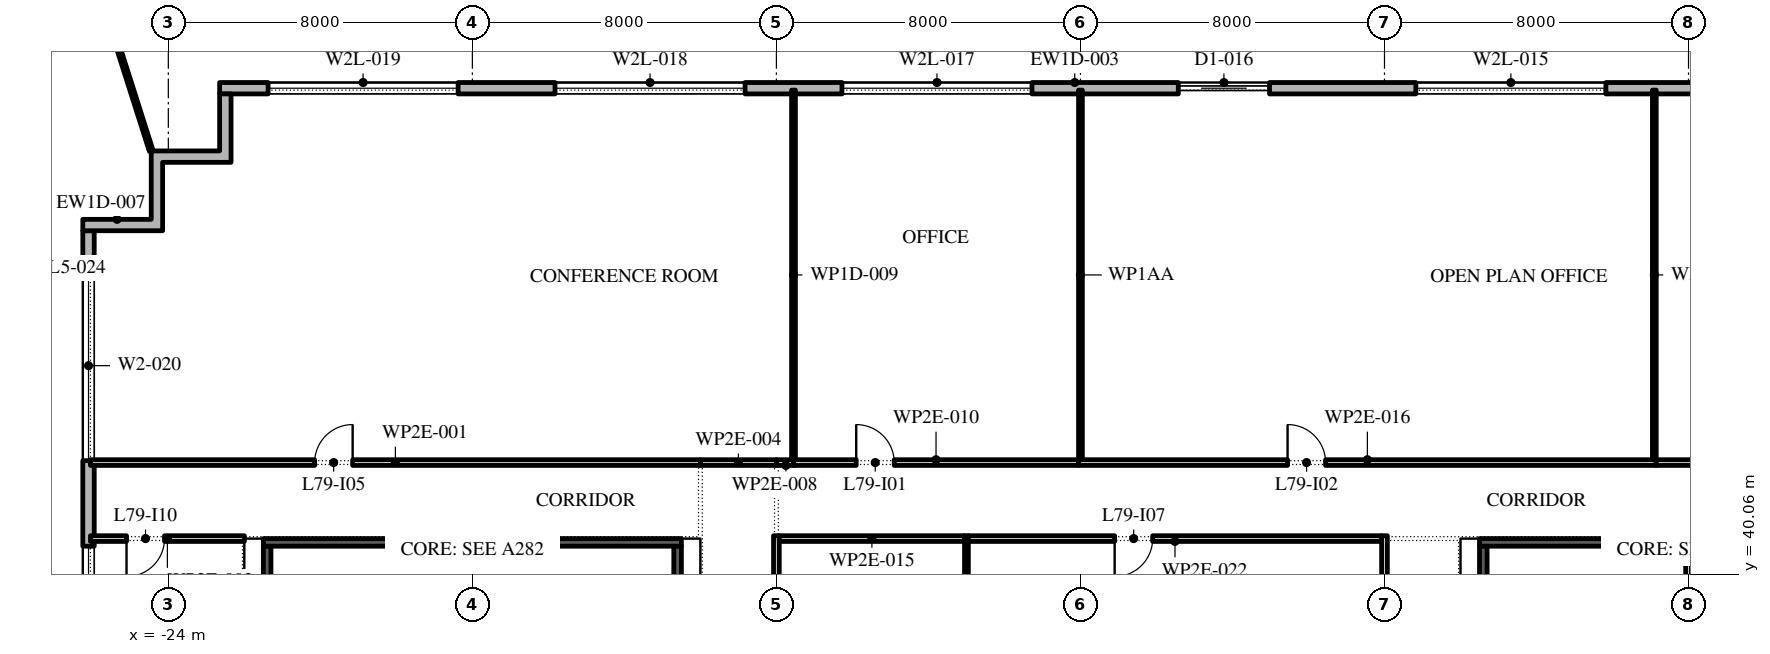
"""IFC4 building model, lengths in metres.
Left out: names, types, materials, properties, quantities, classifications, styles, units other than length and angle.
Written with IfcOpenShell. Run it as: python <this file> out.ifc"""

import sys

from ifc_helpers import new_model, si_unit, direction, frame, frame_2d, origin, place, context, subcontext, project, spatial, polyline, rectangle, outline, extrude, element, fill, save


model = new_model("IFC4")
c1 = context("Model", 3, precision=1e-05, world=origin(), true_north=direction((0.0, 1.0)))
c2 = subcontext(c1, "Body", "Model", "MODEL_VIEW")
j1 = project(units=[si_unit("LENGTHUNIT", "METRE"), si_unit("PLANEANGLEUNIT", "RADIAN")], contexts=[c1])
p1 = place(None, origin())
s1 = spatial("IfcSite", under=j1, at=p1, CompositionType="ELEMENT")
p2 = place(p1, origin())
s2 = spatial("IfcBuilding", under=s1, at=p2, CompositionType="ELEMENT")
p3 = place(p2, frame((0.0, 0.0, 359.4)))
s3 = spatial("IfcBuildingStorey", under=s2, at=p3, CompositionType="ELEMENT", Elevation=359.4)
p4 = place(p3, frame((22.35, 52.85, 0.0), z_axis=(0.0, 0.0, 1.0), x_axis=(-1.0, 0.0, 0.0)))
e1 = element("IfcWall", 1, at=p4, inside=s3, PredefinedType="STANDARD", context=c2, shape_type="SweptSolid", body=[
    extrude(rectangle(XDim=45.0, YDim=0.3, at=frame_2d((22.5, 0.0))), origin(), (0.0, 0.0, 1.0), 3.9),
])
p5 = place(p4, frame((1.125, 0.0, 0.45)))
e2 = element("IfcOpeningElement", 2, at=p5, cuts=e1, PredefinedType="OPENING", context=c2, shape_type="SweptSolid", body=[
    extrude(rectangle(XDim=5.0, YDim=2.4, at=frame_2d((2.5, 1.2))), frame((0.0, 0.16, 0.0), z_axis=(0.0, -1.0, 0.0), x_axis=(1.0, 0.0, 0.0)), (0.0, 0.0, 1.0), 0.32),
])
p6 = place(p4, frame((8.525, 0.0, 0.45)))
e3 = element("IfcOpeningElement", 3, at=p6, cuts=e1, PredefinedType="OPENING", context=c2, shape_type="SweptSolid", body=[
    extrude(rectangle(XDim=5.0, YDim=2.4, at=frame_2d((2.5, 1.2))), frame((0.0, 0.16, 0.0), z_axis=(0.0, -1.0, 0.0), x_axis=(1.0, 0.0, 0.0)), (0.0, 0.0, 1.0), 0.32),
])
p7 = place(p4, frame((17.375, 0.0, 0.0)))
e4 = element("IfcOpeningElement", 4, at=p7, cuts=e1, PredefinedType="OPENING", context=c2, shape_type="SweptSolid", body=[
    extrude(rectangle(XDim=2.4, YDim=3.5, at=frame_2d((1.2, 1.75))), frame((0.0, 0.16, 0.0), z_axis=(0.0, -1.0, 0.0), x_axis=(1.0, 0.0, 0.0)), (0.0, 0.0, 1.0), 0.32),
])
p8 = place(p4, frame((23.625, 0.0, 0.45)))
e5 = element("IfcOpeningElement", 5, at=p8, cuts=e1, PredefinedType="OPENING", context=c2, shape_type="SweptSolid", body=[
    extrude(rectangle(XDim=5.0, YDim=2.4, at=frame_2d((2.5, 1.2))), frame((0.0, 0.16, 0.0), z_axis=(0.0, -1.0, 0.0), x_axis=(1.0, 0.0, 0.0)), (0.0, 0.0, 1.0), 0.32),
])
p9 = place(p4, frame((31.175, 0.0, 0.45)))
e6 = element("IfcOpeningElement", 6, at=p9, cuts=e1, PredefinedType="OPENING", context=c2, shape_type="SweptSolid", body=[
    extrude(rectangle(XDim=5.0, YDim=2.4, at=frame_2d((2.5, 1.2))), frame((0.0, 0.16, 0.0), z_axis=(0.0, -1.0, 0.0), x_axis=(1.0, 0.0, 0.0)), (0.0, 0.0, 1.0), 0.32),
])
p10 = place(p4, frame((38.725, 0.0, 0.45)))
e7 = element("IfcOpeningElement", 7, at=p10, cuts=e1, PredefinedType="OPENING", context=c2, shape_type="SweptSolid", body=[
    extrude(rectangle(XDim=5.0, YDim=2.4, at=frame_2d((2.5, 1.2))), frame((0.0, 0.16, 0.0), z_axis=(0.0, -1.0, 0.0), x_axis=(1.0, 0.0, 0.0)), (0.0, 0.0, 1.0), 0.32),
])
p11 = place(p3, frame((-26.1, 49.1, 0.0), z_axis=(0.0, 0.0, 1.0), x_axis=(0.0, -1.0, 0.0)))
e8 = element("IfcWall", 8, at=p11, inside=s3, PredefinedType="STANDARD", context=c2, shape_type="SweptSolid", body=[
    extrude(rectangle(XDim=51.5, YDim=0.3, at=frame_2d((25.75, 0.0))), origin(), (0.0, 0.0, 1.0), 3.9),
])
p12 = place(p11, frame((1.05, 0.0, 0.45)))
e9 = element("IfcOpeningElement", 9, at=p12, cuts=e8, PredefinedType="OPENING", context=c2, shape_type="SweptSolid", body=[
    extrude(rectangle(XDim=5.0, YDim=3.25, at=frame_2d((2.5, 1.625))), frame((0.0, 0.16, 0.0), z_axis=(0.0, -1.0, 0.0), x_axis=(1.0, 0.0, 0.0)), (0.0, 0.0, 1.0), 0.32),
])
p13 = place(p11, frame((8.3, 0.0, 0.45)))
e10 = element("IfcOpeningElement", 10, at=p13, cuts=e8, PredefinedType="OPENING", context=c2, shape_type="SweptSolid", body=[
    extrude(rectangle(XDim=5.0, YDim=2.9, at=frame_2d((2.5, 1.45))), frame((0.0, 0.16, 0.0), z_axis=(0.0, -1.0, 0.0), x_axis=(1.0, 0.0, 0.0)), (0.0, 0.0, 1.0), 0.32),
])
p14 = place(p11, frame((17.0, 0.0, 0.0)))
e11 = element("IfcOpeningElement", 11, at=p14, cuts=e8, PredefinedType="OPENING", context=c2, shape_type="SweptSolid", body=[
    extrude(rectangle(XDim=2.4, YDim=3.5, at=frame_2d((1.2, 1.75))), frame((0.0, 0.16, 0.0), z_axis=(0.0, -1.0, 0.0), x_axis=(1.0, 0.0, 0.0)), (0.0, 0.0, 1.0), 0.32),
])
p15 = place(p11, frame((23.1, 0.0, 0.45)))
e12 = element("IfcOpeningElement", 12, at=p15, cuts=e8, PredefinedType="OPENING", context=c2, shape_type="SweptSolid", body=[
    extrude(rectangle(XDim=5.0, YDim=2.95, at=frame_2d((2.5, 1.475))), frame((0.0, 0.16, 0.0), z_axis=(0.0, -1.0, 0.0), x_axis=(1.0, 0.0, 0.0)), (0.0, 0.0, 1.0), 0.32),
])
p16 = place(p11, frame((30.5, 0.0, 0.45)))
e13 = element("IfcOpeningElement", 13, at=p16, cuts=e8, PredefinedType="OPENING", context=c2, shape_type="SweptSolid", body=[
    extrude(rectangle(XDim=5.0, YDim=3.25, at=frame_2d((2.5, 1.625))), frame((0.0, 0.16, 0.0), z_axis=(0.0, -1.0, 0.0), x_axis=(1.0, 0.0, 0.0)), (0.0, 0.0, 1.0), 0.32),
])
p17 = place(p11, frame((37.9, 0.0, 0.45)))
e14 = element("IfcOpeningElement", 14, at=p17, cuts=e8, PredefinedType="OPENING", context=c2, shape_type="SweptSolid", body=[
    extrude(rectangle(XDim=5.0, YDim=2.95, at=frame_2d((2.5, 1.475))), frame((0.0, 0.16, 0.0), z_axis=(0.0, -1.0, 0.0), x_axis=(1.0, 0.0, 0.0)), (0.0, 0.0, 1.0), 0.32),
])
p18 = place(p11, frame((46.6, 0.0, 0.0)))
e15 = element("IfcOpeningElement", 15, at=p18, cuts=e8, PredefinedType="OPENING", context=c2, shape_type="SweptSolid", body=[
    extrude(rectangle(XDim=2.4, YDim=3.5, at=frame_2d((1.2, 1.75))), frame((0.0, 0.16, 0.0), z_axis=(0.0, -1.0, 0.0), x_axis=(1.0, 0.0, 0.0)), (0.0, 0.0, 1.0), 0.32),
])
p19 = place(p3, origin())
e16 = element("IfcWall", 16, at=p19, inside=s3, PredefinedType="STANDARD", context=c2, shape_type="SweptSolid", body=[
    extrude(outline(polyline([(-24.45, 49.4), (-24.45, 51.2), (-22.65, 51.2), (-22.65, 52.7), (-22.35, 52.7), (-22.35, 50.9), (-24.15, 50.9), (-24.15, 49.1), (-26.25, 49.1), (-26.25, 49.4), (-24.45, 49.4)])), origin(), (0.0, 0.0, 1.0), 3.9),
])
p20 = place(p3, frame((-24.45, 51.2, -0.05), z_axis=(0.0, 0.0, 1.0), x_axis=(-0.303785175512, 0.952740556048, 0.0)))
e17 = element("IfcWall", 17, at=p20, inside=s3, PredefinedType="STANDARD", context=c2, shape_type="SweptSolid", body=[
    extrude(rectangle(XDim=7.174, YDim=0.1, at=frame_2d((3.587, 0.0))), origin(), (0.0, 0.0, 1.0), 3.95),
])
p21 = place(p3, frame((-21.4, 25.75, 0.0), z_axis=(0.0, 0.0, 1.0), x_axis=(0.0, 1.0, 0.0)))
e18 = element("IfcWall", 18, at=p21, inside=s3, PredefinedType="SHEAR", context=c2, shape_type="SweptSolid", body=[
    extrude(rectangle(XDim=15.05, YDim=0.2, at=frame_2d((7.525, 0.0))), origin(), (0.0, 0.0, 1.0), 3.9),
])
p22 = place(p3, frame((-10.6, 25.75, 0.0), z_axis=(0.0, 0.0, 1.0), x_axis=(0.0, 1.0, 0.0)))
e19 = element("IfcWall", 19, at=p22, inside=s3, PredefinedType="SHEAR", context=c2, shape_type="SweptSolid", body=[
    extrude(rectangle(XDim=15.05, YDim=0.2, at=frame_2d((7.525, 0.0))), origin(), (0.0, 0.0, 1.0), 3.9),
])
p23 = place(p22, frame((7.075, 0.0, 0.0)))
e20 = element("IfcOpeningElement", 20, at=p23, cuts=e19, PredefinedType="OPENING", context=c2, shape_type="SweptSolid", body=[
    extrude(rectangle(XDim=0.9, YDim=2.1, at=frame_2d((0.45, 1.05))), frame((0.0, 0.11, 0.0), z_axis=(0.0, -1.0, 0.0), x_axis=(1.0, 0.0, 0.0)), (0.0, 0.0, 1.0), 0.22),
])
p24 = place(p3, frame((-21.5, 40.9, 0.0), z_axis=(0.0, 0.0, 1.0), x_axis=(1.0, 0.0, 0.0)))
e21 = element("IfcWall", 21, at=p24, inside=s3, PredefinedType="SHEAR", context=c2, shape_type="SweptSolid", body=[
    extrude(rectangle(XDim=11.0, YDim=0.2, at=frame_2d((5.5, 0.0))), origin(), (0.0, 0.0, 1.0), 3.9),
])
p25 = place(p3, frame((10.6, 25.75, 0.0), z_axis=(0.0, 0.0, 1.0), x_axis=(0.0, 1.0, 0.0)))
e22 = element("IfcWall", 22, at=p25, inside=s3, PredefinedType="SHEAR", context=c2, shape_type="SweptSolid", body=[
    extrude(rectangle(XDim=15.05, YDim=0.2, at=frame_2d((7.525, 0.0))), origin(), (0.0, 0.0, 1.0), 3.9),
])
p26 = place(p25, frame((7.075, 0.0, 0.0)))
e23 = element("IfcOpeningElement", 23, at=p26, cuts=e22, PredefinedType="OPENING", context=c2, shape_type="SweptSolid", body=[
    extrude(rectangle(XDim=0.9, YDim=2.1, at=frame_2d((0.45, 1.05))), frame((0.0, 0.11, 0.0), z_axis=(0.0, -1.0, 0.0), x_axis=(1.0, 0.0, 0.0)), (0.0, 0.0, 1.0), 0.22),
])
p27 = place(p3, frame((10.5, 40.9, 0.0), z_axis=(0.0, 0.0, 1.0), x_axis=(1.0, 0.0, 0.0)))
e24 = element("IfcWall", 24, at=p27, inside=s3, PredefinedType="SHEAR", context=c2, shape_type="SweptSolid", body=[
    extrude(rectangle(XDim=11.0, YDim=0.2, at=frame_2d((5.5, 0.0))), origin(), (0.0, 0.0, 1.0), 3.9),
])
p28 = place(p3, frame((16.0, 25.75, 0.0), z_axis=(0.0, 0.0, 1.0), x_axis=(0.0, 1.0, 0.0)))
e25 = element("IfcWall", 25, at=p28, inside=s3, PredefinedType="PARTITIONING", context=c2, shape_type="SweptSolid", body=[
    extrude(rectangle(XDim=15.05, YDim=0.15, at=frame_2d((7.525, 0.0))), origin(), (0.0, 0.0, 1.0), 3.9),
])
p29 = place(p3, frame((-26.05, 43.0, 0.0), z_axis=(0.0, 0.0, 1.0), x_axis=(1.0, 0.0, 0.0)))
e26 = element("IfcWall", 26, at=p29, inside=s3, PredefinedType="PARTITIONING", context=c2, shape_type="SweptSolid", body=[
    extrude(rectangle(XDim=16.05, YDim=0.15, at=frame_2d((8.025, 0.0))), origin(), (0.0, 0.0, 1.0), 3.9),
])
p30 = place(p29, frame((5.9, 0.0, 0.0)))
e27 = element("IfcOpeningElement", 27, at=p30, cuts=e26, PredefinedType="OPENING", context=c2, shape_type="SweptSolid", body=[
    extrude(rectangle(XDim=1.0, YDim=2.1, at=frame_2d((0.5, 1.05))), frame((0.0, 0.085, 0.0), z_axis=(0.0, -1.0, 0.0), x_axis=(1.0, 0.0, 0.0)), (0.0, 0.0, 1.0), 0.17),
])
p31 = place(p3, frame((-22.0, 41.0, 0.0), z_axis=(0.0, 0.0, 1.0), x_axis=(-1.0, 0.0, 0.0)))
e28 = element("IfcWall", 28, at=p31, inside=s3, PredefinedType="PARTITIONING", context=c2, shape_type="SweptSolid", body=[
    extrude(rectangle(XDim=4.05, YDim=0.15, at=frame_2d((2.025, 0.0))), origin(), (0.0, 0.0, 1.0), 3.9),
])
p32 = place(p31, frame((2.1, 0.0, 0.0)))
e29 = element("IfcOpeningElement", 29, at=p32, cuts=e28, PredefinedType="OPENING", context=c2, shape_type="SweptSolid", body=[
    extrude(rectangle(XDim=1.0, YDim=2.1, at=frame_2d((0.5, 1.05))), frame((0.0, 0.085, 0.0), z_axis=(0.0, -1.0, 0.0), x_axis=(1.0, 0.0, 0.0)), (0.0, 0.0, 1.0), 0.17),
])
p33 = place(p3, frame((-10.0, 43.0, 0.0), z_axis=(0.0, 0.0, 1.0), x_axis=(1.0, 0.0, 0.0)))
e30 = element("IfcWall", 30, at=p33, inside=s3, PredefinedType="PARTITIONING", context=c2, shape_type="SweptSolid", body=[
    extrude(rectangle(XDim=2.0, YDim=0.15, at=frame_2d((1.0, 0.0))), origin(), (0.0, 0.0, 1.0), 3.9),
])
p34 = place(p3, frame((-8.0, 41.075, 0.0), z_axis=(0.0, 0.0, 1.0), x_axis=(0.0, -1.0, 0.0)))
e31 = element("IfcWall", 31, at=p34, inside=s3, PredefinedType="PARTITIONING", context=c2, shape_type="SweptSolid", body=[
    extrude(rectangle(XDim=13.925, YDim=0.15, at=frame_2d((6.962, 0.0))), origin(), (0.0, 0.0, 1.0), 3.9),
])
p35 = place(p34, frame((7.975, 0.0, 0.0)))
e32 = element("IfcOpeningElement", 32, at=p35, cuts=e31, PredefinedType="OPENING", context=c2, shape_type="SweptSolid", body=[
    extrude(rectangle(XDim=1.0, YDim=2.1, at=frame_2d((0.5, 1.05))), frame((0.0, 0.085, 0.0), z_axis=(0.0, -1.0, 0.0), x_axis=(1.0, 0.0, 0.0)), (0.0, 0.0, 1.0), 0.17),
])
p36 = place(p3, frame((-8.0, 43.0, 0.0), z_axis=(0.0, 0.0, 1.0), x_axis=(1.0, 0.0, 0.0)))
e33 = element("IfcWall", 33, at=p36, inside=s3, PredefinedType="PARTITIONING", context=c2, shape_type="SweptSolid", body=[
    extrude(rectangle(XDim=0.5, YDim=0.15, at=frame_2d((0.25, 0.0))), origin(), (0.0, 0.0, 1.0), 3.9),
])
p37 = place(p3, frame((-7.55, 43.075, 0.0), z_axis=(0.0, 0.0, 1.0), x_axis=(0.0, 1.0, 0.0)))
e34 = element("IfcWall", 34, at=p37, inside=s3, PredefinedType="PARTITIONING", context=c2, shape_type="SweptSolid", body=[
    extrude(rectangle(XDim=9.725, YDim=0.1, at=frame_2d((4.863, 0.0))), origin(), (0.0, 0.0, 1.0), 3.9),
])
p38 = place(p3, frame((-7.55, 43.0, 0.0), z_axis=(0.0, 0.0, 1.0), x_axis=(1.0, 0.0, 0.0)))
e35 = element("IfcWall", 35, at=p38, inside=s3, PredefinedType="PARTITIONING", context=c2, shape_type="SweptSolid", body=[
    extrude(rectangle(XDim=7.5, YDim=0.15, at=frame_2d((3.75, 0.0))), origin(), (0.0, 0.0, 1.0), 3.9),
])
p39 = place(p38, frame((1.65, 0.0, 0.0)))
e36 = element("IfcOpeningElement", 36, at=p39, cuts=e35, PredefinedType="OPENING", context=c2, shape_type="SweptSolid", body=[
    extrude(rectangle(XDim=1.0, YDim=2.1, at=frame_2d((0.5, 1.05))), frame((0.0, 0.085, 0.0), z_axis=(0.0, -1.0, 0.0), x_axis=(1.0, 0.0, 0.0)), (0.0, 0.0, 1.0), 0.17),
])
p40 = place(p3, frame((-3.0, 37.55, 0.0), z_axis=(0.0, 0.0, 1.0), x_axis=(0.0, 1.0, 0.0)))
e37 = element("IfcWall", 37, at=p40, inside=s3, PredefinedType="PARTITIONING", context=c2, shape_type="SweptSolid", body=[
    extrude(rectangle(XDim=3.525, YDim=0.1, at=frame_2d((1.762, 0.0))), origin(), (0.0, 0.0, 1.0), 3.9),
])
p41 = place(p3, frame((-3.05, 41.0, 0.0), z_axis=(0.0, 0.0, 1.0), x_axis=(-1.0, 0.0, 0.0)))
e38 = element("IfcWall", 38, at=p41, inside=s3, PredefinedType="PARTITIONING", context=c2, shape_type="SweptSolid", body=[
    extrude(rectangle(XDim=4.875, YDim=0.15, at=frame_2d((2.438, 0.0))), origin(), (0.0, 0.0, 1.0), 3.9),
])
p42 = place(p3, frame((-0.05, 43.0, 0.0), z_axis=(0.0, 0.0, 1.0), x_axis=(1.0, 0.0, 0.0)))
e39 = element("IfcWall", 39, at=p42, inside=s3, PredefinedType="PARTITIONING", context=c2, shape_type="SweptSolid", body=[
    extrude(rectangle(XDim=15.2, YDim=0.15, at=frame_2d((7.6, 0.0))), origin(), (0.0, 0.0, 1.0), 3.9),
])
p43 = place(p42, frame((5.5, 0.0, 0.0)))
e40 = element("IfcOpeningElement", 40, at=p43, cuts=e39, PredefinedType="OPENING", context=c2, shape_type="SweptSolid", body=[
    extrude(rectangle(XDim=1.0, YDim=2.1, at=frame_2d((0.5, 1.05))), frame((0.0, 0.085, 0.0), z_axis=(0.0, -1.0, 0.0), x_axis=(1.0, 0.0, 0.0)), (0.0, 0.0, 1.0), 0.17),
])
p44 = place(p3, frame((0.0, 52.8, 0.0), z_axis=(0.0, 0.0, 1.0), x_axis=(0.0, -1.0, 0.0)))
e41 = element("IfcWall", 41, at=p44, inside=s3, PredefinedType="PARTITIONING", context=c2, shape_type="SweptSolid", body=[
    extrude(rectangle(XDim=9.725, YDim=0.1, at=frame_2d((4.863, 0.0))), origin(), (0.0, 0.0, 1.0), 2.973),
])
p45 = place(p3, frame((8.0, 37.55, 0.0), z_axis=(0.0, 0.0, 1.0), x_axis=(0.0, 1.0, 0.0)))
e42 = element("IfcWall", 42, at=p45, inside=s3, PredefinedType="PARTITIONING", context=c2, shape_type="SweptSolid", body=[
    extrude(rectangle(XDim=3.525, YDim=0.15, at=frame_2d((1.762, 0.0))), origin(), (0.0, 0.0, 1.0), 3.9),
])
p46 = place(p3, frame((7.925, 41.0, 0.0), z_axis=(0.0, 0.0, 1.0), x_axis=(-1.0, 0.0, 0.0)))
e43 = element("IfcWall", 43, at=p46, inside=s3, PredefinedType="PARTITIONING", context=c2, shape_type="SweptSolid", body=[
    extrude(rectangle(XDim=10.875, YDim=0.15, at=frame_2d((5.438, 0.0))), origin(), (0.0, 0.0, 1.0), 3.9),
])
p47 = place(p46, frame((6.025, 0.0, 0.0)))
e44 = element("IfcOpeningElement", 44, at=p47, cuts=e43, PredefinedType="OPENING", context=c2, shape_type="SweptSolid", body=[
    extrude(rectangle(XDim=1.0, YDim=2.1, at=frame_2d((0.5, 1.05))), frame((0.0, 0.085, 0.0), z_axis=(0.0, -1.0, 0.0), x_axis=(1.0, 0.0, 0.0)), (0.0, 0.0, 1.0), 0.17),
])
p48 = place(p3, frame((15.15, 43.0, 0.0), z_axis=(0.0, 0.0, 1.0), x_axis=(1.0, 0.0, 0.0)))
e45 = element("IfcWall", 45, at=p48, inside=s3, PredefinedType="PARTITIONING", context=c2, shape_type="SweptSolid", body=[
    extrude(rectangle(XDim=7.55, YDim=0.15, at=frame_2d((3.775, 0.0))), origin(), (0.0, 0.0, 1.0), 3.9),
])
p49 = place(p48, frame((2.35, 0.0, 0.0)))
e46 = element("IfcOpeningElement", 46, at=p49, cuts=e45, PredefinedType="OPENING", context=c2, shape_type="SweptSolid", body=[
    extrude(rectangle(XDim=1.0, YDim=2.1, at=frame_2d((0.5, 1.05))), frame((0.0, 0.085, 0.0), z_axis=(0.0, -1.0, 0.0), x_axis=(1.0, 0.0, 0.0)), (0.0, 0.0, 1.0), 0.17),
])
p50 = place(p3, frame((15.1, 52.8, 0.0), z_axis=(0.0, 0.0, 1.0), x_axis=(0.0, -1.0, 0.0)))
e47 = element("IfcWall", 47, at=p50, inside=s3, PredefinedType="PARTITIONING", context=c2, shape_type="SweptSolid", body=[
    extrude(rectangle(XDim=9.725, YDim=0.1, at=frame_2d((4.863, 0.0))), origin(), (0.0, 0.0, 1.0), 3.9),
])
p51 = place(p6, origin())
e48 = element("IfcWindow", 48, at=p51, inside=s3, PartitioningType="DOUBLE_PANEL_VERTICAL", PredefinedType="WINDOW", context=c2, shape_type="SweptSolid", body=[
    extrude(rectangle(XDim=5.0, YDim=2.4, at=frame_2d((2.5, 1.2))), frame((0.0, 0.03, 0.0), z_axis=(0.0, -1.0, 0.0), x_axis=(1.0, 0.0, 0.0)), (0.0, 0.0, 1.0), 0.06),
])
fill(e3, e48)
p52 = place(p7, origin())
e49 = element("IfcDoor", 49, at=p52, inside=s3, OperationType="DOUBLE_DOOR_SLIDING", PredefinedType="DOOR", context=c2, shape_type="SweptSolid", body=[
    extrude(rectangle(XDim=2.4, YDim=3.5, at=frame_2d((1.2, 1.75))), frame((0.0, 0.025, 0.0), z_axis=(0.0, -1.0, 0.0), x_axis=(1.0, 0.0, 0.0)), (0.0, 0.0, 1.0), 0.05),
])
fill(e4, e49)
p53 = place(p8, origin())
e50 = element("IfcWindow", 50, at=p53, inside=s3, PartitioningType="DOUBLE_PANEL_VERTICAL", PredefinedType="WINDOW", context=c2, shape_type="SweptSolid", body=[
    extrude(rectangle(XDim=5.0, YDim=2.4, at=frame_2d((2.5, 1.2))), frame((0.0, 0.03, 0.0), z_axis=(0.0, -1.0, 0.0), x_axis=(1.0, 0.0, 0.0)), (0.0, 0.0, 1.0), 0.06),
])
fill(e5, e50)
p54 = place(p9, origin())
e51 = element("IfcWindow", 51, at=p54, inside=s3, PartitioningType="DOUBLE_PANEL_VERTICAL", PredefinedType="WINDOW", context=c2, shape_type="SweptSolid", body=[
    extrude(rectangle(XDim=5.0, YDim=2.4, at=frame_2d((2.5, 1.2))), frame((0.0, 0.03, 0.0), z_axis=(0.0, -1.0, 0.0), x_axis=(1.0, 0.0, 0.0)), (0.0, 0.0, 1.0), 0.06),
])
fill(e6, e51)
p55 = place(p10, origin())
e52 = element("IfcWindow", 52, at=p55, inside=s3, PartitioningType="DOUBLE_PANEL_VERTICAL", PredefinedType="WINDOW", context=c2, shape_type="SweptSolid", body=[
    extrude(rectangle(XDim=5.0, YDim=2.4, at=frame_2d((2.5, 1.2))), frame((0.0, 0.03, 0.0), z_axis=(0.0, -1.0, 0.0), x_axis=(1.0, 0.0, 0.0)), (0.0, 0.0, 1.0), 0.06),
])
fill(e7, e52)
p56 = place(p12, origin())
e53 = element("IfcWindow", 53, at=p56, inside=s3, PartitioningType="DOUBLE_PANEL_VERTICAL", PredefinedType="WINDOW", context=c2, shape_type="SweptSolid", body=[
    extrude(rectangle(XDim=5.0, YDim=3.25, at=frame_2d((2.5, 1.625))), frame((0.0, 0.03, 0.0), z_axis=(0.0, -1.0, 0.0), x_axis=(1.0, 0.0, 0.0)), (0.0, 0.0, 1.0), 0.06),
])
fill(e9, e53)
p57 = place(p13, origin())
e54 = element("IfcWindow", 54, at=p57, inside=s3, PartitioningType="DOUBLE_PANEL_VERTICAL", PredefinedType="WINDOW", context=c2, shape_type="SweptSolid", body=[
    extrude(rectangle(XDim=5.0, YDim=2.9, at=frame_2d((2.5, 1.45))), frame((0.0, 0.03, 0.0), z_axis=(0.0, -1.0, 0.0), x_axis=(1.0, 0.0, 0.0)), (0.0, 0.0, 1.0), 0.06),
])
fill(e10, e54)
p58 = place(p39, origin())
e55 = element("IfcDoor", 55, at=p58, inside=s3, OperationType="SINGLE_SWING_RIGHT", PredefinedType="DOOR", context=c2, shape_type="SweptSolid", body=[
    extrude(rectangle(XDim=1.0, YDim=2.1, at=frame_2d((0.5, 1.05))), frame((0.0, 0.025, 0.0), z_axis=(0.0, -1.0, 0.0), x_axis=(1.0, 0.0, 0.0)), (0.0, 0.0, 1.0), 0.05),
])
fill(e36, e55)
p59 = place(p43, origin())
e56 = element("IfcDoor", 56, at=p59, inside=s3, OperationType="SINGLE_SWING_RIGHT", PredefinedType="DOOR", context=c2, shape_type="SweptSolid", body=[
    extrude(rectangle(XDim=1.0, YDim=2.1, at=frame_2d((0.5, 1.05))), frame((0.0, 0.025, 0.0), z_axis=(0.0, -1.0, 0.0), x_axis=(1.0, 0.0, 0.0)), (0.0, 0.0, 1.0), 0.05),
])
fill(e40, e56)
p60 = place(p30, origin())
e57 = element("IfcDoor", 57, at=p60, inside=s3, OperationType="SINGLE_SWING_LEFT", PredefinedType="DOOR", context=c2, shape_type="SweptSolid", body=[
    extrude(rectangle(XDim=1.0, YDim=2.1, at=frame_2d((0.5, 1.05))), frame((0.0, 0.025, 0.0), z_axis=(0.0, -1.0, 0.0), x_axis=(1.0, 0.0, 0.0)), (0.0, 0.0, 1.0), 0.05),
])
fill(e27, e57)
p61 = place(p47, origin())
e58 = element("IfcDoor", 58, at=p61, inside=s3, OperationType="SINGLE_SWING_LEFT", PredefinedType="DOOR", context=c2, shape_type="SweptSolid", body=[
    extrude(rectangle(XDim=1.0, YDim=2.1, at=frame_2d((0.5, 1.05))), frame((0.0, 0.025, 0.0), z_axis=(0.0, -1.0, 0.0), x_axis=(1.0, 0.0, 0.0)), (0.0, 0.0, 1.0), 0.05),
])
fill(e44, e58)
p62 = place(p32, origin())
e59 = element("IfcDoor", 59, at=p62, inside=s3, OperationType="SINGLE_SWING_LEFT", PredefinedType="DOOR", context=c2, shape_type="SweptSolid", body=[
    extrude(rectangle(XDim=1.0, YDim=2.1, at=frame_2d((0.5, 1.05))), frame((0.0, 0.025, 0.0), z_axis=(0.0, -1.0, 0.0), x_axis=(1.0, 0.0, 0.0)), (0.0, 0.0, 1.0), 0.05),
])
fill(e29, e59)
save(model, sys.argv[1])
